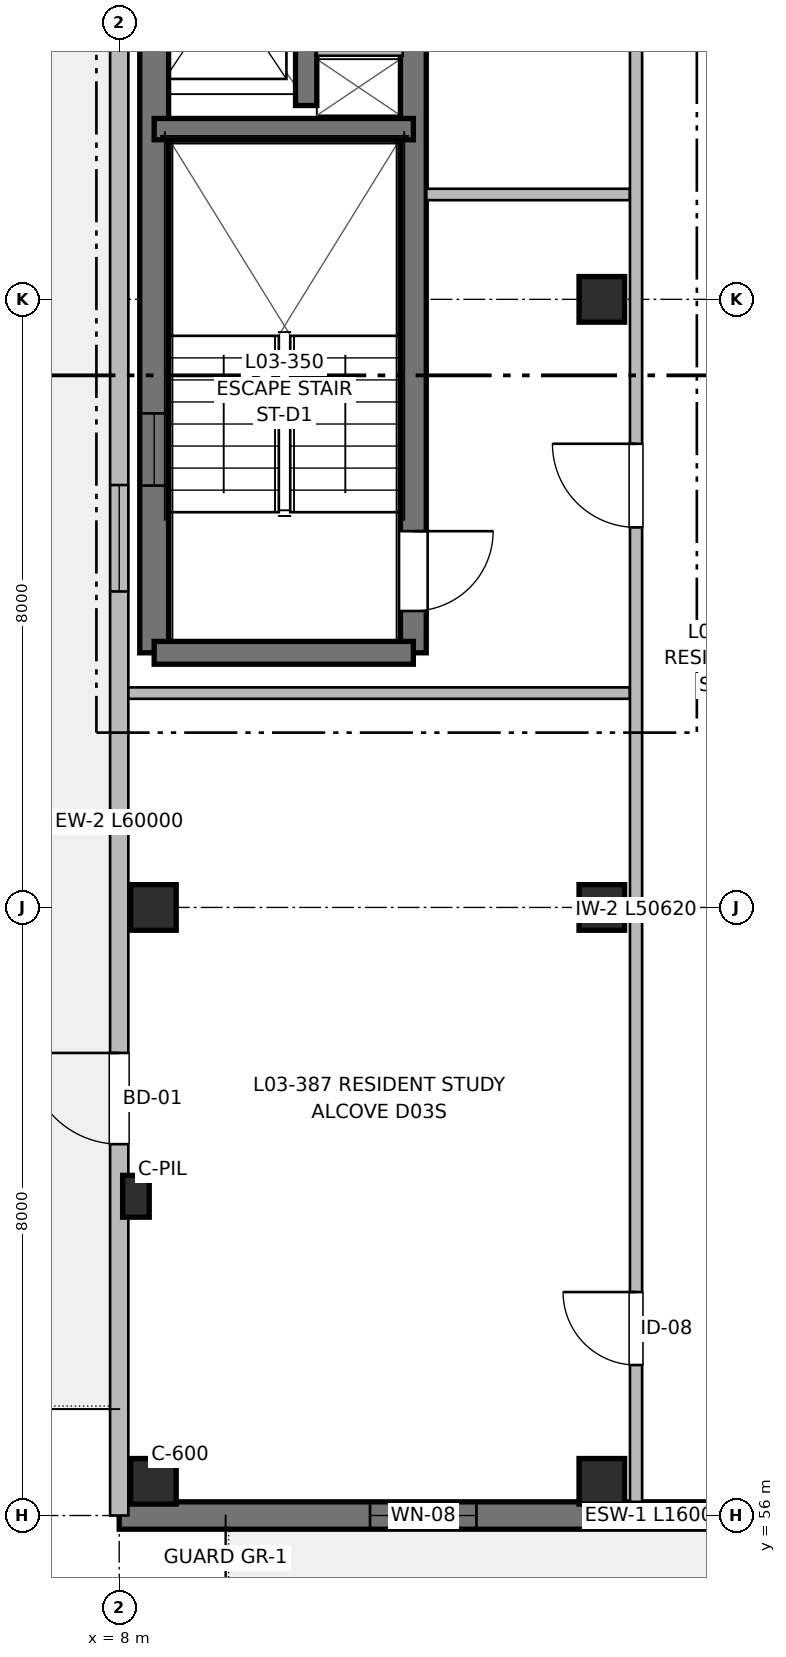
"""IFC4 building model, lengths in metres.
Left out: names, types, materials, properties, quantities, classifications, styles, units other than length and angle.
Written with IfcOpenShell. Run it as: python <this file> out.ifc"""

import sys

from ifc_helpers import new_model, si_unit, direction, frame, frame_2d, origin, origin_2d, place, context, subcontext, project, spatial, rectangle, extrude, element, fill, save


model = new_model("IFC4")
c1 = context("Model", 3, precision=1e-05, world=origin(), true_north=direction((0.0, 1.0)))
c2 = subcontext(c1, "Body", "Model", "MODEL_VIEW")
j1 = project(units=[si_unit("LENGTHUNIT", "METRE"), si_unit("PLANEANGLEUNIT", "RADIAN")], contexts=[c1])
p1 = place(None, origin())
s1 = spatial("IfcSite", under=j1, at=p1, CompositionType="ELEMENT")
p2 = place(p1, origin())
s2 = spatial("IfcBuilding", under=s1, at=p2, CompositionType="ELEMENT")
p3 = place(p2, frame((0.0, 0.0, 10.56)))
s3 = spatial("IfcBuildingStorey", under=s2, at=p3, CompositionType="ELEMENT", Elevation=10.56)
p4 = place(p3, frame((8.22, 60.2, 0.0), z_axis=(0.0, 0.0, 1.0), x_axis=(1.0, 0.0, 0.0)))
e1 = element("IfcColumn", 1, at=p4, inside=s3, PredefinedType="PILASTER", context=c2, shape_type="SweptSolid", body=[
    extrude(rectangle(XDim=0.35, YDim=0.55, at=origin_2d()), origin(), (0.0, 0.0, 1.0), 3.2),
])
for number, where, z_axis, x_axis in (
    (2, (8.45, 56.45, 0.0), (0.0, 0.0, 1.0), (1.0, 0.0, 0.0)),
    (3, (8.45, 64.0, 0.0), (0.0, 0.0, 1.0), (1.0, 0.0, 0.0)),
    (4, (14.35, 56.45, 0.0), (0.0, 0.0, 1.0), (1.0, 0.0, 0.0)),
    (5, (14.35, 64.0, 0.0), (0.0, 0.0, 1.0), (1.0, 0.0, 0.0)),
    (6, (14.35, 72.0, 0.0), (0.0, 0.0, 1.0), (1.0, 0.0, 0.0)),
):
    element("IfcColumn", number, at=place(p3, frame(where, z_axis=z_axis, x_axis=x_axis)), inside=s3, PredefinedType="COLUMN", context=c2, shape_type="SweptSolid", body=[
        extrude(rectangle(XDim=0.6, YDim=0.6, at=origin_2d()), origin(), (0.0, 0.0, 1.0), 3.2),
    ])
p5 = place(p3, frame((8.46, 67.35, 0.0), z_axis=(0.0, 0.0, 1.0), x_axis=(0.0, 1.0, 0.0)))
e7 = element("IfcWall", 7, at=p5, inside=s3, PredefinedType="SHEAR", context=c2, shape_type="SweptSolid", body=[
    extrude(rectangle(XDim=12.45, YDim=0.38, at=frame_2d((6.225, 0.0))), origin(), (0.0, 0.0, 1.0), 3.2),
])
p6 = place(p5, frame((2.2, 0.0, 0.97)))
e8 = element("IfcOpeningElement", 8, at=p6, cuts=e7, PredefinedType="OPENING", context=c2, shape_type="SweptSolid", body=[
    extrude(rectangle(XDim=0.95, YDim=1.25, at=frame_2d((0.475, 0.625))), frame((0.0, 0.2, 0.0), z_axis=(0.0, -1.0, 0.0), x_axis=(1.0, 0.0, 0.0)), (0.0, 0.0, 1.0), 0.4),
])
p7 = place(p3, frame((11.87, 79.8, 0.0), z_axis=(0.0, 0.0, 1.0), x_axis=(0.0, -1.0, 0.0)))
e9 = element("IfcWall", 9, at=p7, inside=s3, PredefinedType="SHEAR", context=c2, shape_type="SweptSolid", body=[
    extrude(rectangle(XDim=12.45, YDim=0.34, at=frame_2d((6.225, 0.0))), origin(), (0.0, 0.0, 1.0), 3.2),
])
p8 = place(p7, frame((10.85, 0.0, 0.0)))
e10 = element("IfcOpeningElement", 10, at=p8, cuts=e9, PredefinedType="OPENING", context=c2, shape_type="SweptSolid", body=[
    extrude(rectangle(XDim=1.05, YDim=2.15, at=frame_2d((0.525, 1.075))), frame((0.0, 0.18, 0.0), z_axis=(0.0, -1.0, 0.0), x_axis=(1.0, 0.0, 0.0)), (0.0, 0.0, 1.0), 0.36),
])
p9 = place(p3, frame((11.87, 67.35, 0.0), z_axis=(0.0, 0.0, 1.0), x_axis=(-1.0, 0.0, 0.0)))
e11 = element("IfcWall", 11, at=p9, inside=s3, PredefinedType="SHEAR", context=c2, shape_type="SweptSolid", body=[
    extrude(rectangle(XDim=3.41, YDim=0.3, at=frame_2d((1.705, 0.0))), origin(), (0.0, 0.0, 1.0), 3.2),
])
p10 = place(p3, frame((8.46, 74.24, 0.0), z_axis=(0.0, 0.0, 1.0), x_axis=(1.0, 0.0, 0.0)))
e12 = element("IfcWall", 12, at=p10, inside=s3, PredefinedType="SHEAR", context=c2, shape_type="SweptSolid", body=[
    extrude(rectangle(XDim=3.41, YDim=0.28, at=frame_2d((1.705, 0.0))), origin(), (0.0, 0.0, 1.0), 3.2),
])
p11 = place(p3, frame((10.46, 74.55, 0.0), z_axis=(0.0, 0.0, 1.0), x_axis=(0.0, 1.0, 0.0)))
e13 = element("IfcWall", 13, at=p11, inside=s3, PredefinedType="SHEAR", context=c2, shape_type="SweptSolid", body=[
    extrude(rectangle(XDim=5.25, YDim=0.28, at=frame_2d((2.625, 0.0))), origin(), (0.0, 0.0, 1.0), 3.2),
])
p12 = place(p11, frame((1.15, 0.0, 0.0)))
e14 = element("IfcOpeningElement", 14, at=p12, cuts=e13, PredefinedType="OPENING", context=c2, shape_type="SweptSolid", body=[
    extrude(rectangle(XDim=1.0, YDim=2.15, at=frame_2d((0.5, 1.075))), frame((0.0, 0.15, 0.0), z_axis=(0.0, -1.0, 0.0), x_axis=(1.0, 0.0, 0.0)), (0.0, 0.0, 1.0), 0.3),
])
p13 = place(p11, frame((3.85, 0.0, 0.0)))
e15 = element("IfcOpeningElement", 15, at=p13, cuts=e13, PredefinedType="OPENING", context=c2, shape_type="SweptSolid", body=[
    extrude(rectangle(XDim=0.9, YDim=2.15, at=frame_2d((0.45, 1.075))), frame((0.0, 0.15, 0.0), z_axis=(0.0, -1.0, 0.0), x_axis=(1.0, 0.0, 0.0)), (0.0, 0.0, 1.0), 0.3),
])
p14 = place(p3, frame((10.6, 75.28, 0.0), z_axis=(0.0, 0.0, 1.0), x_axis=(1.0, 0.0, 0.0)))
e16 = element("IfcWall", 16, at=p14, inside=s3, PredefinedType="PARTITIONING", context=c2, shape_type="SweptSolid", body=[
    extrude(rectangle(XDim=1.13, YDim=0.15, at=frame_2d((0.565, 0.0))), origin(), (0.0, 0.0, 1.0), 2.95),
])
p15 = place(p3, frame((24.0, 56.0, 0.0), z_axis=(0.0, 0.0, 1.0), x_axis=(-1.0, 0.0, 0.0)))
e17 = element("IfcWall", 17, at=p15, inside=s3, PredefinedType="SHEAR", context=c2, shape_type="SweptSolid", body=[
    extrude(rectangle(XDim=16.0, YDim=0.36, at=frame_2d((8.0, 0.0))), origin(), (0.0, 0.0, 1.0), 2.98),
])
p16 = place(p15, frame((3.4, 0.0, 0.0)))
e18 = element("IfcOpeningElement", 18, at=p16, cuts=e17, PredefinedType="OPENING", context=c2, shape_type="SweptSolid", body=[
    extrude(rectangle(XDim=1.2, YDim=2.2, at=frame_2d((0.6, 1.1))), frame((0.0, 0.19, 0.0), z_axis=(0.0, -1.0, 0.0), x_axis=(1.0, 0.0, 0.0)), (0.0, 0.0, 1.0), 0.38),
])
p17 = place(p15, frame((5.3, 0.0, 0.82)))
e19 = element("IfcOpeningElement", 19, at=p17, cuts=e17, PredefinedType="OPENING", context=c2, shape_type="SweptSolid", body=[
    extrude(rectangle(XDim=1.3, YDim=1.4, at=frame_2d((0.65, 0.7))), frame((0.0, 0.19, 0.0), z_axis=(0.0, -1.0, 0.0), x_axis=(1.0, 0.0, 0.0)), (0.0, 0.0, 1.0), 0.38),
])
p18 = place(p15, frame((11.3, 0.0, 0.87)))
e20 = element("IfcOpeningElement", 20, at=p18, cuts=e17, PredefinedType="OPENING", context=c2, shape_type="SweptSolid", body=[
    extrude(rectangle(XDim=1.4, YDim=1.35, at=frame_2d((0.7, 0.675))), frame((0.0, 0.19, 0.0), z_axis=(0.0, -1.0, 0.0), x_axis=(1.0, 0.0, 0.0)), (0.0, 0.0, 1.0), 0.38),
])
p19 = place(p3, frame((8.0, 56.0, 0.0), z_axis=(0.0, 0.0, 1.0), x_axis=(0.0, 1.0, 0.0)))
e21 = element("IfcWall", 21, at=p19, inside=s3, PredefinedType="SOLIDWALL", context=c2, shape_type="SweptSolid", body=[
    extrude(rectangle(XDim=60.0, YDim=0.24, at=frame_2d((30.0, 0.0))), origin(), (0.0, 0.0, 1.0), 2.98),
])
p20 = place(p19, frame((4.886, 0.0, 0.0)))
e22 = element("IfcOpeningElement", 22, at=p20, cuts=e21, PredefinedType="OPENING", context=c2, shape_type="SweptSolid", body=[
    extrude(rectangle(XDim=1.2, YDim=2.2, at=frame_2d((0.6, 1.1))), frame((0.0, 0.13, 0.0), z_axis=(0.0, -1.0, 0.0), x_axis=(1.0, 0.0, 0.0)), (0.0, 0.0, 1.0), 0.26),
])
p21 = place(p19, frame((12.157, 0.0, 0.87)))
e23 = element("IfcOpeningElement", 23, at=p21, cuts=e21, PredefinedType="OPENING", context=c2, shape_type="SweptSolid", body=[
    extrude(rectangle(XDim=1.4, YDim=1.35, at=frame_2d((0.7, 0.675))), frame((0.0, 0.13, 0.0), z_axis=(0.0, -1.0, 0.0), x_axis=(1.0, 0.0, 0.0)), (0.0, 0.0, 1.0), 0.26),
])
p22 = place(p19, frame((20.354, 0.0, 0.87)))
e24 = element("IfcOpeningElement", 24, at=p22, cuts=e21, PredefinedType="OPENING", context=c2, shape_type="SweptSolid", body=[
    extrude(rectangle(XDim=1.25, YDim=1.35, at=frame_2d((0.625, 0.675))), frame((0.0, 0.13, 0.0), z_axis=(0.0, -1.0, 0.0), x_axis=(1.0, 0.0, 0.0)), (0.0, 0.0, 1.0), 0.26),
])
p23 = place(p19, frame((29.35, 0.0, 0.82)))
e25 = element("IfcOpeningElement", 25, at=p23, cuts=e21, PredefinedType="OPENING", context=c2, shape_type="SweptSolid", body=[
    extrude(rectangle(XDim=1.3, YDim=1.4, at=frame_2d((0.65, 0.7))), frame((0.0, 0.13, 0.0), z_axis=(0.0, -1.0, 0.0), x_axis=(1.0, 0.0, 0.0)), (0.0, 0.0, 1.0), 0.26),
])
p24 = place(p19, frame((37.521, 0.0, 0.67)))
e26 = element("IfcOpeningElement", 26, at=p24, cuts=e21, PredefinedType="OPENING", context=c2, shape_type="SweptSolid", body=[
    extrude(rectangle(XDim=2.1, YDim=1.55, at=frame_2d((1.05, 0.775))), frame((0.0, 0.13, 0.0), z_axis=(0.0, -1.0, 0.0), x_axis=(1.0, 0.0, 0.0)), (0.0, 0.0, 1.0), 0.26),
])
p25 = place(p19, frame((55.639, 0.0, 0.9)))
e27 = element("IfcOpeningElement", 27, at=p25, cuts=e21, PredefinedType="OPENING", context=c2, shape_type="SweptSolid", body=[
    extrude(rectangle(XDim=1.05, YDim=1.15, at=frame_2d((0.525, 0.575))), frame((0.0, 0.13, 0.0), z_axis=(0.0, -1.0, 0.0), x_axis=(1.0, 0.0, 0.0)), (0.0, 0.0, 1.0), 0.26),
])
p26 = place(p3, frame((8.12, 66.82, 0.0), z_axis=(0.0, 0.0, 1.0), x_axis=(1.0, 0.0, 0.0)))
e28 = element("IfcWall", 28, at=p26, inside=s3, PredefinedType="PARTITIONING", context=c2, shape_type="SweptSolid", body=[
    extrude(rectangle(XDim=6.6, YDim=0.15, at=frame_2d((3.3, 0.0))), origin(), (0.0, 0.0, 1.0), 2.935),
])
p27 = place(p3, frame((12.04, 73.38, 0.0), z_axis=(0.0, 0.0, 1.0), x_axis=(1.0, 0.0, 0.0)))
e29 = element("IfcWall", 29, at=p27, inside=s3, PredefinedType="PARTITIONING", context=c2, shape_type="SweptSolid", body=[
    extrude(rectangle(XDim=2.68, YDim=0.15, at=frame_2d((1.34, 0.0))), origin(), (0.0, 0.0, 1.0), 2.935),
])
p28 = place(p3, frame((14.8, 56.18, 0.0), z_axis=(0.0, 0.0, 1.0), x_axis=(0.0, 1.0, 0.0)))
e30 = element("IfcWall", 30, at=p28, inside=s3, PredefinedType="PARTITIONING", context=c2, shape_type="SweptSolid", body=[
    extrude(rectangle(XDim=50.62, YDim=0.16, at=frame_2d((25.31, 0.0))), origin(), (0.0, 0.0, 1.0), 2.935),
])
p29 = place(p28, frame((12.82, 0.0, 0.0)))
e31 = element("IfcOpeningElement", 31, at=p29, cuts=e30, PredefinedType="OPENING", context=c2, shape_type="SweptSolid", body=[
    extrude(rectangle(XDim=1.1, YDim=2.15, at=frame_2d((0.55, 1.075))), frame((0.0, 0.09, 0.0), z_axis=(0.0, -1.0, 0.0), x_axis=(1.0, 0.0, 0.0)), (0.0, 0.0, 1.0), 0.18),
])
p30 = place(p28, frame((19.22, 0.0, 0.0)))
e32 = element("IfcOpeningElement", 32, at=p30, cuts=e30, PredefinedType="OPENING", context=c2, shape_type="SweptSolid", body=[
    extrude(rectangle(XDim=1.6, YDim=2.15, at=frame_2d((0.8, 1.075))), frame((0.0, 0.09, 0.0), z_axis=(0.0, -1.0, 0.0), x_axis=(1.0, 0.0, 0.0)), (0.0, 0.0, 1.0), 0.18),
])
p31 = place(p28, frame((1.8, 0.0, 0.0)))
e33 = element("IfcOpeningElement", 33, at=p31, cuts=e30, PredefinedType="OPENING", context=c2, shape_type="SweptSolid", body=[
    extrude(rectangle(XDim=0.96, YDim=2.15, at=frame_2d((0.48, 1.075))), frame((0.0, 0.09, 0.0), z_axis=(0.0, -1.0, 0.0), x_axis=(1.0, 0.0, 0.0)), (0.0, 0.0, 1.0), 0.18),
])
p32 = place(p28, frame((32.825, 0.0, 0.0)))
e34 = element("IfcOpeningElement", 34, at=p32, cuts=e30, PredefinedType="OPENING", context=c2, shape_type="SweptSolid", body=[
    extrude(rectangle(XDim=0.98, YDim=2.15, at=frame_2d((0.49, 1.075))), frame((0.0, 0.09, 0.0), z_axis=(0.0, -1.0, 0.0), x_axis=(1.0, 0.0, 0.0)), (0.0, 0.0, 1.0), 0.18),
])
p33 = place(p28, frame((40.635, 0.0, 0.0)))
e35 = element("IfcOpeningElement", 35, at=p33, cuts=e30, PredefinedType="OPENING", context=c2, shape_type="SweptSolid", body=[
    extrude(rectangle(XDim=0.98, YDim=2.15, at=frame_2d((0.49, 1.075))), frame((0.0, 0.09, 0.0), z_axis=(0.0, -1.0, 0.0), x_axis=(1.0, 0.0, 0.0)), (0.0, 0.0, 1.0), 0.18),
])
p34 = place(p8, origin())
e36 = element("IfcDoor", 36, at=p34, inside=s3, OperationType="SINGLE_SWING_LEFT", PredefinedType="DOOR", context=c2, shape_type="SweptSolid", body=[
    extrude(rectangle(XDim=1.05, YDim=2.15, at=frame_2d((0.525, 1.075))), frame((0.0, 0.025, 0.0), z_axis=(0.0, -1.0, 0.0), x_axis=(1.0, 0.0, 0.0)), (0.0, 0.0, 1.0), 0.05),
])
fill(e10, e36)
p35 = place(p6, origin())
e37 = element("IfcWindow", 37, at=p35, inside=s3, PartitioningType="SINGLE_PANEL", PredefinedType="WINDOW", context=c2, shape_type="SweptSolid", body=[
    extrude(rectangle(XDim=0.95, YDim=1.25, at=frame_2d((0.475, 0.625))), frame((0.0, 0.03, 0.0), z_axis=(0.0, -1.0, 0.0), x_axis=(1.0, 0.0, 0.0)), (0.0, 0.0, 1.0), 0.06),
])
fill(e8, e37)
p36 = place(p18, origin())
e38 = element("IfcWindow", 38, at=p36, inside=s3, PartitioningType="SINGLE_PANEL", PredefinedType="WINDOW", context=c2, shape_type="SweptSolid", body=[
    extrude(rectangle(XDim=1.4, YDim=1.35, at=frame_2d((0.7, 0.675))), frame((0.0, 0.03, 0.0), z_axis=(0.0, -1.0, 0.0), x_axis=(1.0, 0.0, 0.0)), (0.0, 0.0, 1.0), 0.06),
])
fill(e20, e38)
p37 = place(p20, origin())
e39 = element("IfcDoor", 39, at=p37, inside=s3, OperationType="SINGLE_SWING_RIGHT", PredefinedType="DOOR", context=c2, shape_type="SweptSolid", body=[
    extrude(rectangle(XDim=1.2, YDim=2.2, at=frame_2d((0.6, 1.1))), frame((0.0, 0.025, 0.0), z_axis=(0.0, -1.0, 0.0), x_axis=(1.0, 0.0, 0.0)), (0.0, 0.0, 1.0), 0.05),
])
fill(e22, e39)
p38 = place(p21, origin())
e40 = element("IfcWindow", 40, at=p38, inside=s3, PartitioningType="SINGLE_PANEL", PredefinedType="WINDOW", context=c2, shape_type="SweptSolid", body=[
    extrude(rectangle(XDim=1.4, YDim=1.35, at=frame_2d((0.7, 0.675))), frame((0.0, 0.03, 0.0), z_axis=(0.0, -1.0, 0.0), x_axis=(1.0, 0.0, 0.0)), (0.0, 0.0, 1.0), 0.06),
])
fill(e23, e40)
p39 = place(p29, origin())
e41 = element("IfcDoor", 41, at=p39, inside=s3, OperationType="SINGLE_SWING_RIGHT", PredefinedType="DOOR", context=c2, shape_type="SweptSolid", body=[
    extrude(rectangle(XDim=1.1, YDim=2.15, at=frame_2d((0.55, 1.075))), frame((0.0, 0.025, 0.0), z_axis=(0.0, -1.0, 0.0), x_axis=(1.0, 0.0, 0.0)), (0.0, 0.0, 1.0), 0.05),
])
fill(e31, e41)
p40 = place(p31, origin())
e42 = element("IfcDoor", 42, at=p40, inside=s3, OperationType="SINGLE_SWING_RIGHT", PredefinedType="DOOR", context=c2, shape_type="SweptSolid", body=[
    extrude(rectangle(XDim=0.96, YDim=2.15, at=frame_2d((0.48, 1.075))), frame((0.0, 0.025, 0.0), z_axis=(0.0, -1.0, 0.0), x_axis=(1.0, 0.0, 0.0)), (0.0, 0.0, 1.0), 0.05),
])
fill(e33, e42)
save(model, sys.argv[1])
